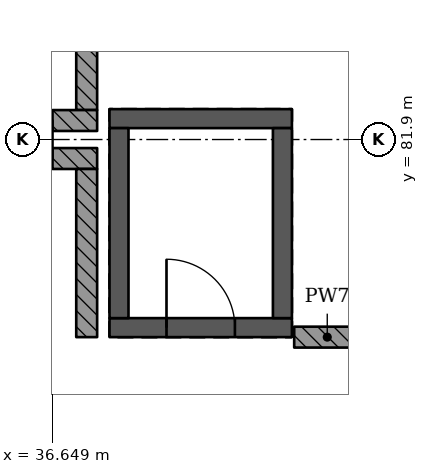
"""IFC4 building model, lengths in metres.
Left out: names, types, materials, properties, quantities, classifications, styles, units other than length and angle.
Written with IfcOpenShell. Run it as: python <this file> out.ifc"""

import sys

from ifc_helpers import new_model, si_unit, direction, frame, frame_2d, origin, place, context, subcontext, project, spatial, rectangle, extrude, element, fill, save


model = new_model("IFC4")
c1 = context("Model", 3, precision=1e-05, world=origin(), true_north=direction((0.0, 1.0)))
c2 = subcontext(c1, "Body", "Model", "MODEL_VIEW")
j1 = project(units=[si_unit("LENGTHUNIT", "METRE"), si_unit("PLANEANGLEUNIT", "RADIAN")], contexts=[c1])
p1 = place(None, origin())
s1 = spatial("IfcSite", under=j1, at=p1, CompositionType="ELEMENT")
p2 = place(p1, origin())
s2 = spatial("IfcBuilding", under=s1, at=p2, CompositionType="ELEMENT")
p3 = place(p2, frame((0.0, 0.0, 29.12)))
s3 = spatial("IfcBuildingStorey", under=s2, at=p3, CompositionType="ELEMENT", Elevation=29.12)
p4 = place(p3, frame((39.8, 79.425, 0.0), z_axis=(0.0, 0.0, 1.0), x_axis=(-1.0, 0.0, 0.0)))
e1 = element("IfcWall", 1, at=p4, inside=s3, PredefinedType="SHEAR", context=c2, shape_type="SweptSolid", body=[
    extrude(rectangle(XDim=2.4, YDim=0.25, at=frame_2d((1.2, 0.0))), origin(), (0.0, 0.0, 1.0), 4.55),
])
p5 = place(p4, frame((0.75, 0.0, 0.0)))
e2 = element("IfcOpeningElement", 2, at=p5, cuts=e1, PredefinedType="OPENING", context=c2, shape_type="SweptSolid", body=[
    extrude(rectangle(XDim=0.9, YDim=2.1, at=frame_2d((0.45, 1.05))), frame((0.0, 0.135, 0.0), z_axis=(0.0, -1.0, 0.0), x_axis=(1.0, 0.0, 0.0)), (0.0, 0.0, 1.0), 0.27),
])
p6 = place(p3, frame((39.8, 82.175, 0.0), z_axis=(0.0, 0.0, 1.0), x_axis=(-1.0, 0.0, 0.0)))
e3 = element("IfcWall", 3, at=p6, inside=s3, PredefinedType="SHEAR", context=c2, shape_type="SweptSolid", body=[
    extrude(rectangle(XDim=2.4, YDim=0.25, at=frame_2d((1.2, 0.0))), origin(), (0.0, 0.0, 1.0), 4.55),
])
for number, where, z_axis, x_axis in (
    (4, (37.525, 82.05, 0.0), (0.0, 0.0, 1.0), (0.0, -1.0, 0.0)),
    (5, (39.675, 82.05, 0.0), (0.0, 0.0, 1.0), (0.0, -1.0, 0.0)),
):
    element("IfcWall", number, at=place(p3, frame(where, z_axis=z_axis, x_axis=x_axis)), inside=s3, PredefinedType="SHEAR", context=c2, shape_type="SweptSolid", body=[
        extrude(rectangle(XDim=2.5, YDim=0.25, at=frame_2d((1.25, 0.0))), origin(), (0.0, 0.0, 1.0), 4.55),
    ])
p7 = place(p3, frame((36.65, 81.65, 0.0), z_axis=(0.0, 0.0, 1.0), x_axis=(1.0, 0.0, 0.0)))
e6 = element("IfcWall", 6, at=p7, inside=s3, PredefinedType="SOLIDWALL", context=c2, shape_type="SweptSolid", body=[
    extrude(rectangle(XDim=0.588, YDim=0.275, at=frame_2d((0.294, 0.0))), origin(), (0.0, 0.0, 1.0), 3.88),
])
p8 = place(p3, frame((37.1, 81.512, 0.0), z_axis=(0.0, 0.0, 1.0), x_axis=(0.0, -1.0, 0.0)))
e7 = element("IfcWall", 7, at=p8, inside=s3, PredefinedType="SOLIDWALL", context=c2, shape_type="SweptSolid", body=[
    extrude(rectangle(XDim=2.212, YDim=0.275, at=frame_2d((1.106, 0.0))), origin(), (0.0, 0.0, 1.0), 3.88),
])
p9 = place(p3, frame((37.1, 89.262, 0.0), z_axis=(0.0, 0.0, 1.0), x_axis=(0.0, -1.0, 0.0)))
e8 = element("IfcWall", 8, at=p9, inside=s3, PredefinedType="SOLIDWALL", context=c2, shape_type="SweptSolid", body=[
    extrude(rectangle(XDim=6.975, YDim=0.275, at=frame_2d((3.487, 0.0))), origin(), (0.0, 0.0, 1.0), 3.88),
])
p10 = place(p3, frame((37.238, 82.15, 0.0), z_axis=(0.0, 0.0, 1.0), x_axis=(-1.0, 0.0, 0.0)))
e9 = element("IfcWall", 9, at=p10, inside=s3, PredefinedType="SOLIDWALL", context=c2, shape_type="SweptSolid", body=[
    extrude(rectangle(XDim=0.588, YDim=0.275, at=frame_2d((0.294, 0.0))), origin(), (0.0, 0.0, 1.0), 3.88),
])
p11 = place(p3, frame((40.7, 79.3, 0.0), z_axis=(0.0, 0.0, 1.0), x_axis=(-1.0, 0.0, 0.0)))
e10 = element("IfcWall", 10, at=p11, inside=s3, PredefinedType="SOLIDWALL", context=c2, shape_type="SweptSolid", body=[
    extrude(rectangle(XDim=0.87, YDim=0.275, at=frame_2d((0.435, 0.0))), origin(), (0.0, 0.0, 1.0), 3.88),
])
p12 = place(p5, origin())
e11 = element("IfcDoor", 11, at=p12, inside=s3, OperationType="SINGLE_SWING_RIGHT", PredefinedType="DOOR", context=c2, shape_type="SweptSolid", body=[
    extrude(rectangle(XDim=0.9, YDim=2.1, at=frame_2d((0.45, 1.05))), frame((0.0, 0.025, 0.0), z_axis=(0.0, -1.0, 0.0), x_axis=(1.0, 0.0, 0.0)), (0.0, 0.0, 1.0), 0.05),
])
fill(e2, e11)
save(model, sys.argv[1])
